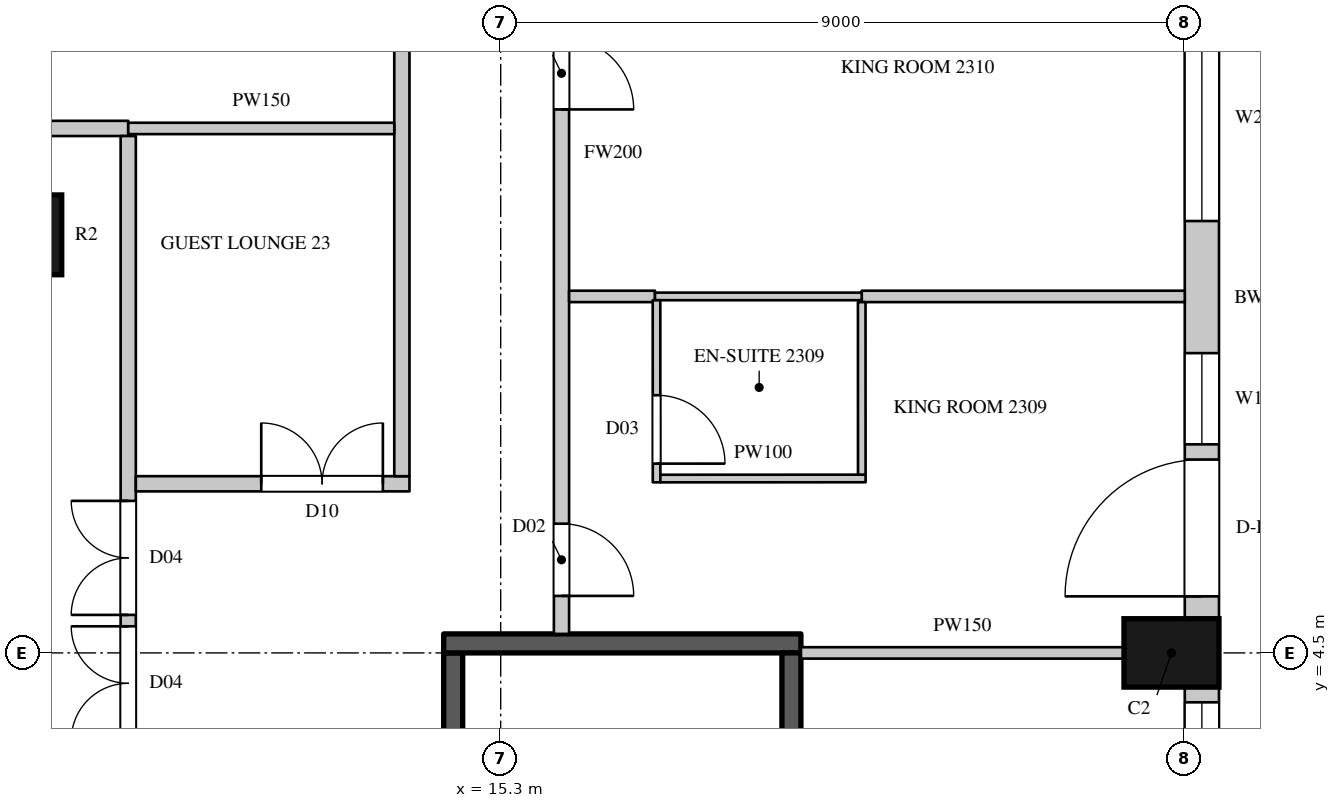
"""IFC4 building model, lengths in metres.
Left out: names, types, materials, properties, quantities, classifications, styles, units other than length and angle.
Written with IfcOpenShell. Run it as: python <this file> out.ifc"""

import sys

from ifc_helpers import new_model, si_unit, direction, frame, frame_2d, origin, origin_2d, place, context, subcontext, project, spatial, rectangle, circle, extrude, element, fill, save


model = new_model("IFC4")
c1 = context("Model", 3, precision=1e-05, world=origin(), true_north=direction((0.0, 1.0)))
c2 = subcontext(c1, "Body", "Model", "MODEL_VIEW")
j1 = project(units=[si_unit("LENGTHUNIT", "METRE"), si_unit("PLANEANGLEUNIT", "RADIAN")], contexts=[c1])
p1 = place(None, origin())
s1 = spatial("IfcSite", under=j1, at=p1, CompositionType="ELEMENT")
p2 = place(p1, origin())
s2 = spatial("IfcBuilding", under=s1, at=p2, CompositionType="ELEMENT")
p3 = place(p2, frame((0.0, 0.0, 113.1)))
s3 = spatial("IfcBuildingStorey", under=s2, at=p3, CompositionType="ELEMENT", Elevation=113.1)
p4 = place(p3, frame((24.125, 4.5, 0.0), z_axis=(0.0, 0.0, 1.0), x_axis=(0.0, 1.0, 0.0)))
e1 = element("IfcColumn", 1, at=p4, inside=s3, PredefinedType="COLUMN", context=c2, shape_type="SweptSolid", body=[
    extrude(rectangle(XDim=0.9, YDim=1.25, at=origin_2d()), origin(), (0.0, 0.0, 1.0), 3.6),
])
p5 = place(p3, frame((9.0, 10.0, 0.0), z_axis=(0.0, 0.0, 1.0), x_axis=(1.0, 0.0, 0.0)))
e2 = element("IfcColumn", 2, at=p5, inside=s3, PredefinedType="COLUMN", context=c2, shape_type="SweptSolid", body=[
    extrude(circle(Radius=0.525, at=origin_2d()), origin(), (0.0, 0.0, 1.0), 3.6),
])
p6 = place(p3, frame((24.525, -4.05, 0.0), z_axis=(0.0, 0.0, 1.0), x_axis=(0.0, 1.0, 0.0)))
e3 = element("IfcWall", 3, at=p6, inside=s3, PredefinedType="SOLIDWALL", context=c2, shape_type="SweptSolid", body=[
    extrude(rectangle(XDim=8.1, YDim=0.45, at=frame_2d((4.05, 0.0))), origin(), (0.0, 0.0, 1.0), 3.3),
])
p7 = place(p6, frame((0.2, 0.0, 0.0)))
e4 = element("IfcOpeningElement", 4, at=p7, cuts=e3, PredefinedType="OPENING", context=c2, shape_type="SweptSolid", body=[
    extrude(rectangle(XDim=1.8, YDim=2.4, at=frame_2d((0.9, 1.2))), frame((0.0, 0.235, 0.0), z_axis=(0.0, -1.0, 0.0), x_axis=(1.0, 0.0, 0.0)), (0.0, 0.0, 1.0), 0.47),
])
p8 = place(p6, frame((2.2, 0.0, 1.05)))
e5 = element("IfcOpeningElement", 5, at=p8, cuts=e3, PredefinedType="OPENING", context=c2, shape_type="SweptSolid", body=[
    extrude(rectangle(XDim=1.2, YDim=2.0, at=frame_2d((0.6, 1.0))), frame((0.0, 0.235, 0.0), z_axis=(0.0, -1.0, 0.0), x_axis=(1.0, 0.0, 0.0)), (0.0, 0.0, 1.0), 0.47),
])
p9 = place(p6, frame((4.7, 0.0, 0.0)))
e6 = element("IfcOpeningElement", 6, at=p9, cuts=e3, PredefinedType="OPENING", context=c2, shape_type="SweptSolid", body=[
    extrude(rectangle(XDim=1.8, YDim=2.4, at=frame_2d((0.9, 1.2))), frame((0.0, 0.235, 0.0), z_axis=(0.0, -1.0, 0.0), x_axis=(1.0, 0.0, 0.0)), (0.0, 0.0, 1.0), 0.47),
])
p10 = place(p6, frame((6.7, 0.0, 1.05)))
e7 = element("IfcOpeningElement", 7, at=p10, cuts=e3, PredefinedType="OPENING", context=c2, shape_type="SweptSolid", body=[
    extrude(rectangle(XDim=1.2, YDim=2.0, at=frame_2d((0.6, 1.0))), frame((0.0, 0.235, 0.0), z_axis=(0.0, -1.0, 0.0), x_axis=(1.0, 0.0, 0.0)), (0.0, 0.0, 1.0), 0.47),
])
p11 = place(p3, frame((24.525, 4.95, 0.0), z_axis=(0.0, 0.0, 1.0), x_axis=(0.0, 1.0, 0.0)))
e8 = element("IfcWall", 8, at=p11, inside=s3, PredefinedType="SOLIDWALL", context=c2, shape_type="SweptSolid", body=[
    extrude(rectangle(XDim=8.439, YDim=0.45, at=frame_2d((4.219, 0.0))), origin(), (0.0, 0.0, 1.0), 3.3),
])
p12 = place(p11, frame((0.294, 0.0, 0.0)))
e9 = element("IfcOpeningElement", 9, at=p12, cuts=e8, PredefinedType="OPENING", context=c2, shape_type="SweptSolid", body=[
    extrude(rectangle(XDim=1.8, YDim=2.4, at=frame_2d((0.9, 1.2))), frame((0.0, 0.235, 0.0), z_axis=(0.0, -1.0, 0.0), x_axis=(1.0, 0.0, 0.0)), (0.0, 0.0, 1.0), 0.47),
])
p13 = place(p11, frame((2.294, 0.0, 1.05)))
e10 = element("IfcOpeningElement", 10, at=p13, cuts=e8, PredefinedType="OPENING", context=c2, shape_type="SweptSolid", body=[
    extrude(rectangle(XDim=1.2, YDim=2.0, at=frame_2d((0.6, 1.0))), frame((0.0, 0.235, 0.0), z_axis=(0.0, -1.0, 0.0), x_axis=(1.0, 0.0, 0.0)), (0.0, 0.0, 1.0), 0.47),
])
p14 = place(p11, frame((5.232, 0.0, 1.05)))
e11 = element("IfcOpeningElement", 11, at=p14, cuts=e8, PredefinedType="OPENING", context=c2, shape_type="SweptSolid", body=[
    extrude(rectangle(XDim=2.7, YDim=2.0, at=frame_2d((1.35, 1.0))), frame((0.0, 0.235, 0.0), z_axis=(0.0, -1.0, 0.0), x_axis=(1.0, 0.0, 0.0)), (0.0, 0.0, 1.0), 0.47),
])
p15 = place(p3, frame((-8.3, 11.4, 0.0), z_axis=(0.0, 0.0, 1.0), x_axis=(1.0, 0.0, 0.0)))
e12 = element("IfcWall", 12, at=p15, inside=s3, PredefinedType="PARTITIONING", context=c2, shape_type="SweptSolid", body=[
    extrude(rectangle(XDim=18.7, YDim=0.2, at=frame_2d((9.35, 0.0))), origin(), (0.0, 0.0, 1.0), 3.3),
])
p16 = place(p15, frame((3.4, 0.0, 0.0)))
e13 = element("IfcOpeningElement", 13, at=p16, cuts=e12, PredefinedType="OPENING", context=c2, shape_type="SweptSolid", body=[
    extrude(rectangle(XDim=1.5, YDim=2.2, at=frame_2d((0.75, 1.1))), frame((0.0, 0.11, 0.0), z_axis=(0.0, -1.0, 0.0), x_axis=(1.0, 0.0, 0.0)), (0.0, 0.0, 1.0), 0.22),
])
p17 = place(p3, frame((10.4, -11.3, 0.0), z_axis=(0.0, 0.0, 1.0), x_axis=(0.0, 1.0, 0.0)))
e14 = element("IfcWall", 14, at=p17, inside=s3, PredefinedType="PARTITIONING", context=c2, shape_type="SweptSolid", body=[
    extrude(rectangle(XDim=22.6, YDim=0.2, at=frame_2d((11.3, 0.0))), origin(), (0.0, 0.0, 1.0), 3.3),
])
p18 = place(p17, frame((16.3, 0.0, 0.0)))
e15 = element("IfcOpeningElement", 15, at=p18, cuts=e14, PredefinedType="OPENING", context=c2, shape_type="SweptSolid", body=[
    extrude(rectangle(XDim=1.5, YDim=2.2, at=frame_2d((0.75, 1.1))), frame((0.0, 0.11, 0.0), z_axis=(0.0, -1.0, 0.0), x_axis=(1.0, 0.0, 0.0)), (0.0, 0.0, 1.0), 0.22),
])
p19 = place(p17, frame((14.65, 0.0, 0.0)))
e16 = element("IfcOpeningElement", 16, at=p19, cuts=e14, PredefinedType="OPENING", context=c2, shape_type="SweptSolid", body=[
    extrude(rectangle(XDim=1.5, YDim=2.2, at=frame_2d((0.75, 1.1))), frame((0.0, 0.11, 0.0), z_axis=(0.0, -1.0, 0.0), x_axis=(1.0, 0.0, 0.0)), (0.0, 0.0, 1.0), 0.22),
])
p20 = place(p17, frame((11.95, 0.0, 0.0)))
e17 = element("IfcOpeningElement", 17, at=p20, cuts=e14, PredefinedType="OPENING", context=c2, shape_type="SweptSolid", body=[
    extrude(rectangle(XDim=1.5, YDim=2.2, at=frame_2d((0.75, 1.1))), frame((0.0, 0.11, 0.0), z_axis=(0.0, -1.0, 0.0), x_axis=(1.0, 0.0, 0.0)), (0.0, 0.0, 1.0), 0.22),
])
p21 = place(p3, frame((10.5, 6.725, 0.0), z_axis=(0.0, 0.0, 1.0), x_axis=(1.0, 0.0, 0.0)))
e18 = element("IfcWall", 18, at=p21, inside=s3, PredefinedType="PARTITIONING", context=c2, shape_type="SweptSolid", body=[
    extrude(rectangle(XDim=3.6, YDim=0.2, at=frame_2d((1.8, 0.0))), origin(), (0.0, 0.0, 1.0), 3.3),
])
p22 = place(p21, frame((1.65, 0.0, 0.0)))
e19 = element("IfcOpeningElement", 19, at=p22, cuts=e18, PredefinedType="OPENING", context=c2, shape_type="SweptSolid", body=[
    extrude(rectangle(XDim=1.6, YDim=2.4, at=frame_2d((0.8, 1.2))), frame((0.0, 0.11, 0.0), z_axis=(0.0, -1.0, 0.0), x_axis=(1.0, 0.0, 0.0)), (0.0, 0.0, 1.0), 0.22),
])
p23 = place(p3, frame((14.0, 6.825, 0.0), z_axis=(0.0, 0.0, 1.0), x_axis=(0.0, 1.0, 0.0)))
e20 = element("IfcWall", 20, at=p23, inside=s3, PredefinedType="PARTITIONING", context=c2, shape_type="SweptSolid", body=[
    extrude(rectangle(XDim=8.475, YDim=0.2, at=frame_2d((4.238, 0.0))), origin(), (0.0, 0.0, 1.0), 3.3),
])
p24 = place(p3, frame((16.1, 4.75, 0.0), z_axis=(0.0, 0.0, 1.0), x_axis=(0.0, 1.0, 0.0)))
e21 = element("IfcWall", 21, at=p24, inside=s3, PredefinedType="PARTITIONING", context=c2, shape_type="SweptSolid", body=[
    extrude(rectangle(XDim=12.65, YDim=0.2, at=frame_2d((6.325, 0.0))), origin(), (0.0, 0.0, 1.0), 3.3),
])
p25 = place(p24, frame((0.5, 0.0, 0.0)))
e22 = element("IfcOpeningElement", 22, at=p25, cuts=e21, PredefinedType="OPENING", context=c2, shape_type="SweptSolid", body=[
    extrude(rectangle(XDim=0.95, YDim=2.2, at=frame_2d((0.475, 1.1))), frame((0.0, 0.11, 0.0), z_axis=(0.0, -1.0, 0.0), x_axis=(1.0, 0.0, 0.0)), (0.0, 0.0, 1.0), 0.22),
])
p26 = place(p24, frame((6.9, 0.0, 0.0)))
e23 = element("IfcOpeningElement", 23, at=p26, cuts=e21, PredefinedType="OPENING", context=c2, shape_type="SweptSolid", body=[
    extrude(rectangle(XDim=0.95, YDim=2.2, at=frame_2d((0.475, 1.1))), frame((0.0, 0.11, 0.0), z_axis=(0.0, -1.0, 0.0), x_axis=(1.0, 0.0, 0.0)), (0.0, 0.0, 1.0), 0.22),
])
p27 = place(p3, frame((10.4, 11.4, 0.0), z_axis=(0.0, 0.0, 1.0), x_axis=(1.0, 0.0, 0.0)))
e24 = element("IfcWall", 24, at=p27, inside=s3, PredefinedType="PARTITIONING", context=c2, shape_type="SweptSolid", body=[
    extrude(rectangle(XDim=3.5, YDim=0.15, at=frame_2d((1.75, 0.0))), origin(), (0.0, 0.0, 1.0), 3.3),
])
p28 = place(p3, frame((16.2, 9.19, 0.0), z_axis=(0.0, 0.0, 1.0), x_axis=(1.0, 0.0, 0.0)))
e25 = element("IfcWall", 25, at=p28, inside=s3, PredefinedType="PARTITIONING", context=c2, shape_type="SweptSolid", body=[
    extrude(rectangle(XDim=1.13, YDim=0.15, at=frame_2d((0.565, 0.0))), origin(), (0.0, 0.0, 1.0), 2.65),
])
p29 = place(p3, frame((19.25, 4.5, 0.0), z_axis=(0.0, 0.0, 1.0), x_axis=(1.0, 0.0, 0.0)))
e26 = element("IfcWall", 26, at=p29, inside=s3, PredefinedType="PARTITIONING", context=c2, shape_type="SweptSolid", body=[
    extrude(rectangle(XDim=4.25, YDim=0.15, at=frame_2d((2.125, 0.0))), origin(), (0.0, 0.0, 1.0), 3.3),
])
p30 = place(p3, frame((20.05, 9.19, 0.0), z_axis=(0.0, 0.0, 1.0), x_axis=(1.0, 0.0, 0.0)))
e27 = element("IfcWall", 27, at=p30, inside=s3, PredefinedType="PARTITIONING", context=c2, shape_type="SweptSolid", body=[
    extrude(rectangle(XDim=4.25, YDim=0.15, at=frame_2d((2.125, 0.0))), origin(), (0.0, 0.0, 1.0), 2.65),
])
p31 = place(p3, frame((14.675, -4.5, 0.0), z_axis=(0.0, 0.0, 1.0), x_axis=(0.0, 1.0, 0.0)))
e28 = element("IfcWall", 28, at=p31, inside=s3, PredefinedType="SHEAR", context=c2, shape_type="SweptSolid", body=[
    extrude(rectangle(XDim=9.0, YDim=0.25, at=frame_2d((4.5, 0.0))), origin(), (0.0, 0.0, 1.0), 3.3),
])
p32 = place(p31, frame((0.45, 0.0, 0.0)))
e29 = element("IfcOpeningElement", 29, at=p32, cuts=e28, PredefinedType="OPENING", context=c2, shape_type="SweptSolid", body=[
    extrude(rectangle(XDim=1.1, YDim=2.2, at=frame_2d((0.55, 1.1))), frame((0.0, 0.135, 0.0), z_axis=(0.0, -1.0, 0.0), x_axis=(1.0, 0.0, 0.0)), (0.0, 0.0, 1.0), 0.27),
])
p33 = place(p3, frame((14.55, 4.625, 0.0), z_axis=(0.0, 0.0, 1.0), x_axis=(1.0, 0.0, 0.0)))
e30 = element("IfcWall", 30, at=p33, inside=s3, PredefinedType="SHEAR", context=c2, shape_type="SweptSolid", body=[
    extrude(rectangle(XDim=4.7, YDim=0.25, at=frame_2d((2.35, 0.0))), origin(), (0.0, 0.0, 1.0), 3.3),
])
p34 = place(p3, frame((19.125, -4.5, 0.0), z_axis=(0.0, 0.0, 1.0), x_axis=(0.0, 1.0, 0.0)))
e31 = element("IfcWall", 31, at=p34, inside=s3, PredefinedType="SHEAR", context=c2, shape_type="SweptSolid", body=[
    extrude(rectangle(XDim=9.0, YDim=0.25, at=frame_2d((4.5, 0.0))), origin(), (0.0, 0.0, 1.0), 3.3),
])
p35 = place(p3, frame((17.33, 9.19, 0.0), z_axis=(0.0, 0.0, 1.0), x_axis=(1.0, 0.0, 0.0)))
e32 = element("IfcWall", 32, at=p35, inside=s3, PredefinedType="PARTITIONING", context=c2, shape_type="SweptSolid", body=[
    extrude(rectangle(XDim=2.72, YDim=0.1, at=frame_2d((1.36, 0.0))), origin(), (0.0, 0.0, 1.0), 2.65),
])
p36 = place(p3, frame((17.35, 9.14, 0.0), z_axis=(0.0, 0.0, 1.0), x_axis=(0.000407580973, -0.999999916939, 0.0)))
e33 = element("IfcWall", 33, at=p36, inside=s3, PredefinedType="PARTITIONING", context=c2, shape_type="SweptSolid", body=[
    extrude(rectangle(XDim=2.396, YDim=0.1, at=frame_2d((1.198, 0.0))), origin(), (0.0, 0.0, 1.0), 3.3),
])
p37 = place(p36, frame((1.25, 0.0, 0.0)))
e34 = element("IfcOpeningElement", 34, at=p37, cuts=e33, PredefinedType="OPENING", context=c2, shape_type="SweptSolid", body=[
    extrude(rectangle(XDim=0.9, YDim=2.2, at=frame_2d((0.45, 1.1))), frame((0.0, 0.06, 0.0), z_axis=(0.0, -1.0, 0.0), x_axis=(1.0, 0.0, 0.0)), (0.0, 0.0, 1.0), 0.12),
])
p38 = place(p3, frame((17.401, 6.794, 0.0), z_axis=(0.0, 0.0, 1.0), x_axis=(0.9999999346, 0.000361663629, 0.0)))
e35 = element("IfcWall", 35, at=p38, inside=s3, PredefinedType="PARTITIONING", context=c2, shape_type="SweptSolid", body=[
    extrude(rectangle(XDim=2.7, YDim=0.1, at=frame_2d((1.35, 0.0))), origin(), (0.0, 0.0, 1.0), 3.3),
])
p39 = place(p3, frame((20.05, 9.115, 0.0), z_axis=(0.0, 0.0, 1.0), x_axis=(0.000430200003, -0.999999907464, 0.0)))
e36 = element("IfcWall", 36, at=p39, inside=s3, PredefinedType="PARTITIONING", context=c2, shape_type="SweptSolid", body=[
    extrude(rectangle(XDim=2.27, YDim=0.1, at=frame_2d((1.135, 0.0))), origin(), (0.0, 0.0, 1.0), 3.3),
])
p40 = place(p10, origin())
e37 = element("IfcWindow", 37, at=p40, inside=s3, PartitioningType="SINGLE_PANEL", PredefinedType="WINDOW", context=c2, shape_type="SweptSolid", body=[
    extrude(rectangle(XDim=1.2, YDim=2.0, at=frame_2d((0.6, 1.0))), frame((0.0, 0.135, 0.0), z_axis=(0.0, -1.0, 0.0), x_axis=(1.0, 0.0, 0.0)), (0.0, 0.0, 1.0), 0.06),
])
fill(e7, e37)
p41 = place(p12, origin())
e38 = element("IfcDoor", 38, at=p41, inside=s3, OperationType="SLIDING_TO_LEFT", PredefinedType="DOOR", context=c2, shape_type="SweptSolid", body=[
    extrude(rectangle(XDim=1.8, YDim=2.4, at=frame_2d((0.9, 1.2))), frame((0.0, 0.13, 0.0), z_axis=(0.0, -1.0, 0.0), x_axis=(1.0, 0.0, 0.0)), (0.0, 0.0, 1.0), 0.05),
])
fill(e9, e38)
p42 = place(p13, origin())
e39 = element("IfcWindow", 39, at=p42, inside=s3, PartitioningType="SINGLE_PANEL", PredefinedType="WINDOW", context=c2, shape_type="SweptSolid", body=[
    extrude(rectangle(XDim=1.2, YDim=2.0, at=frame_2d((0.6, 1.0))), frame((0.0, 0.135, 0.0), z_axis=(0.0, -1.0, 0.0), x_axis=(1.0, 0.0, 0.0)), (0.0, 0.0, 1.0), 0.06),
])
fill(e10, e39)
p43 = place(p14, origin())
e40 = element("IfcWindow", 40, at=p43, inside=s3, PartitioningType="SINGLE_PANEL", PredefinedType="WINDOW", context=c2, shape_type="SweptSolid", body=[
    extrude(rectangle(XDim=2.7, YDim=2.0, at=frame_2d((1.35, 1.0))), frame((0.0, 0.135, 0.0), z_axis=(0.0, -1.0, 0.0), x_axis=(1.0, 0.0, 0.0)), (0.0, 0.0, 1.0), 0.06),
])
fill(e11, e40)
p44 = place(p18, origin())
e41 = element("IfcDoor", 41, at=p44, inside=s3, OperationType="DOUBLE_DOOR_SINGLE_SWING", PredefinedType="DOOR", context=c2, shape_type="SweptSolid", body=[
    extrude(rectangle(XDim=1.5, YDim=2.2, at=frame_2d((0.75, 1.1))), frame((0.0, 0.025, 0.0), z_axis=(0.0, -1.0, 0.0), x_axis=(1.0, 0.0, 0.0)), (0.0, 0.0, 1.0), 0.05),
])
fill(e15, e41)
p45 = place(p19, origin())
e42 = element("IfcDoor", 42, at=p45, inside=s3, OperationType="DOUBLE_DOOR_SINGLE_SWING", PredefinedType="DOOR", context=c2, shape_type="SweptSolid", body=[
    extrude(rectangle(XDim=1.5, YDim=2.2, at=frame_2d((0.75, 1.1))), frame((0.0, 0.025, 0.0), z_axis=(0.0, -1.0, 0.0), x_axis=(1.0, 0.0, 0.0)), (0.0, 0.0, 1.0), 0.05),
])
fill(e16, e42)
p46 = place(p22, origin())
e43 = element("IfcDoor", 43, at=p46, inside=s3, OperationType="DOUBLE_DOOR_SINGLE_SWING", PredefinedType="DOOR", context=c2, shape_type="SweptSolid", body=[
    extrude(rectangle(XDim=1.6, YDim=2.4, at=frame_2d((0.8, 1.2))), frame((0.0, 0.025, 0.0), z_axis=(0.0, -1.0, 0.0), x_axis=(1.0, 0.0, 0.0)), (0.0, 0.0, 1.0), 0.05),
])
fill(e19, e43)
p47 = place(p25, origin())
e44 = element("IfcDoor", 44, at=p47, inside=s3, OperationType="SINGLE_SWING_RIGHT", PredefinedType="DOOR", context=c2, shape_type="SweptSolid", body=[
    extrude(rectangle(XDim=0.95, YDim=2.2, at=frame_2d((0.475, 1.1))), frame((0.0, 0.025, 0.0), z_axis=(0.0, -1.0, 0.0), x_axis=(1.0, 0.0, 0.0)), (0.0, 0.0, 1.0), 0.05),
])
fill(e22, e44)
p48 = place(p37, origin())
e45 = element("IfcDoor", 45, at=p48, inside=s3, OperationType="SINGLE_SWING_RIGHT", PredefinedType="DOOR", context=c2, shape_type="SweptSolid", body=[
    extrude(rectangle(XDim=0.9, YDim=2.2, at=frame_2d((0.45, 1.1))), frame((0.0, 0.025, 0.0), z_axis=(0.0, -1.0, 0.0), x_axis=(1.0, 0.0, 0.0)), (0.0, 0.0, 1.0), 0.05),
])
fill(e34, e45)
p49 = place(p26, origin())
e46 = element("IfcDoor", 46, at=p49, inside=s3, OperationType="SINGLE_SWING_RIGHT", PredefinedType="DOOR", context=c2, shape_type="SweptSolid", body=[
    extrude(rectangle(XDim=0.95, YDim=2.2, at=frame_2d((0.475, 1.1))), frame((0.0, 0.025, 0.0), z_axis=(0.0, -1.0, 0.0), x_axis=(1.0, 0.0, 0.0)), (0.0, 0.0, 1.0), 0.05),
])
fill(e23, e46)
save(model, sys.argv[1])
